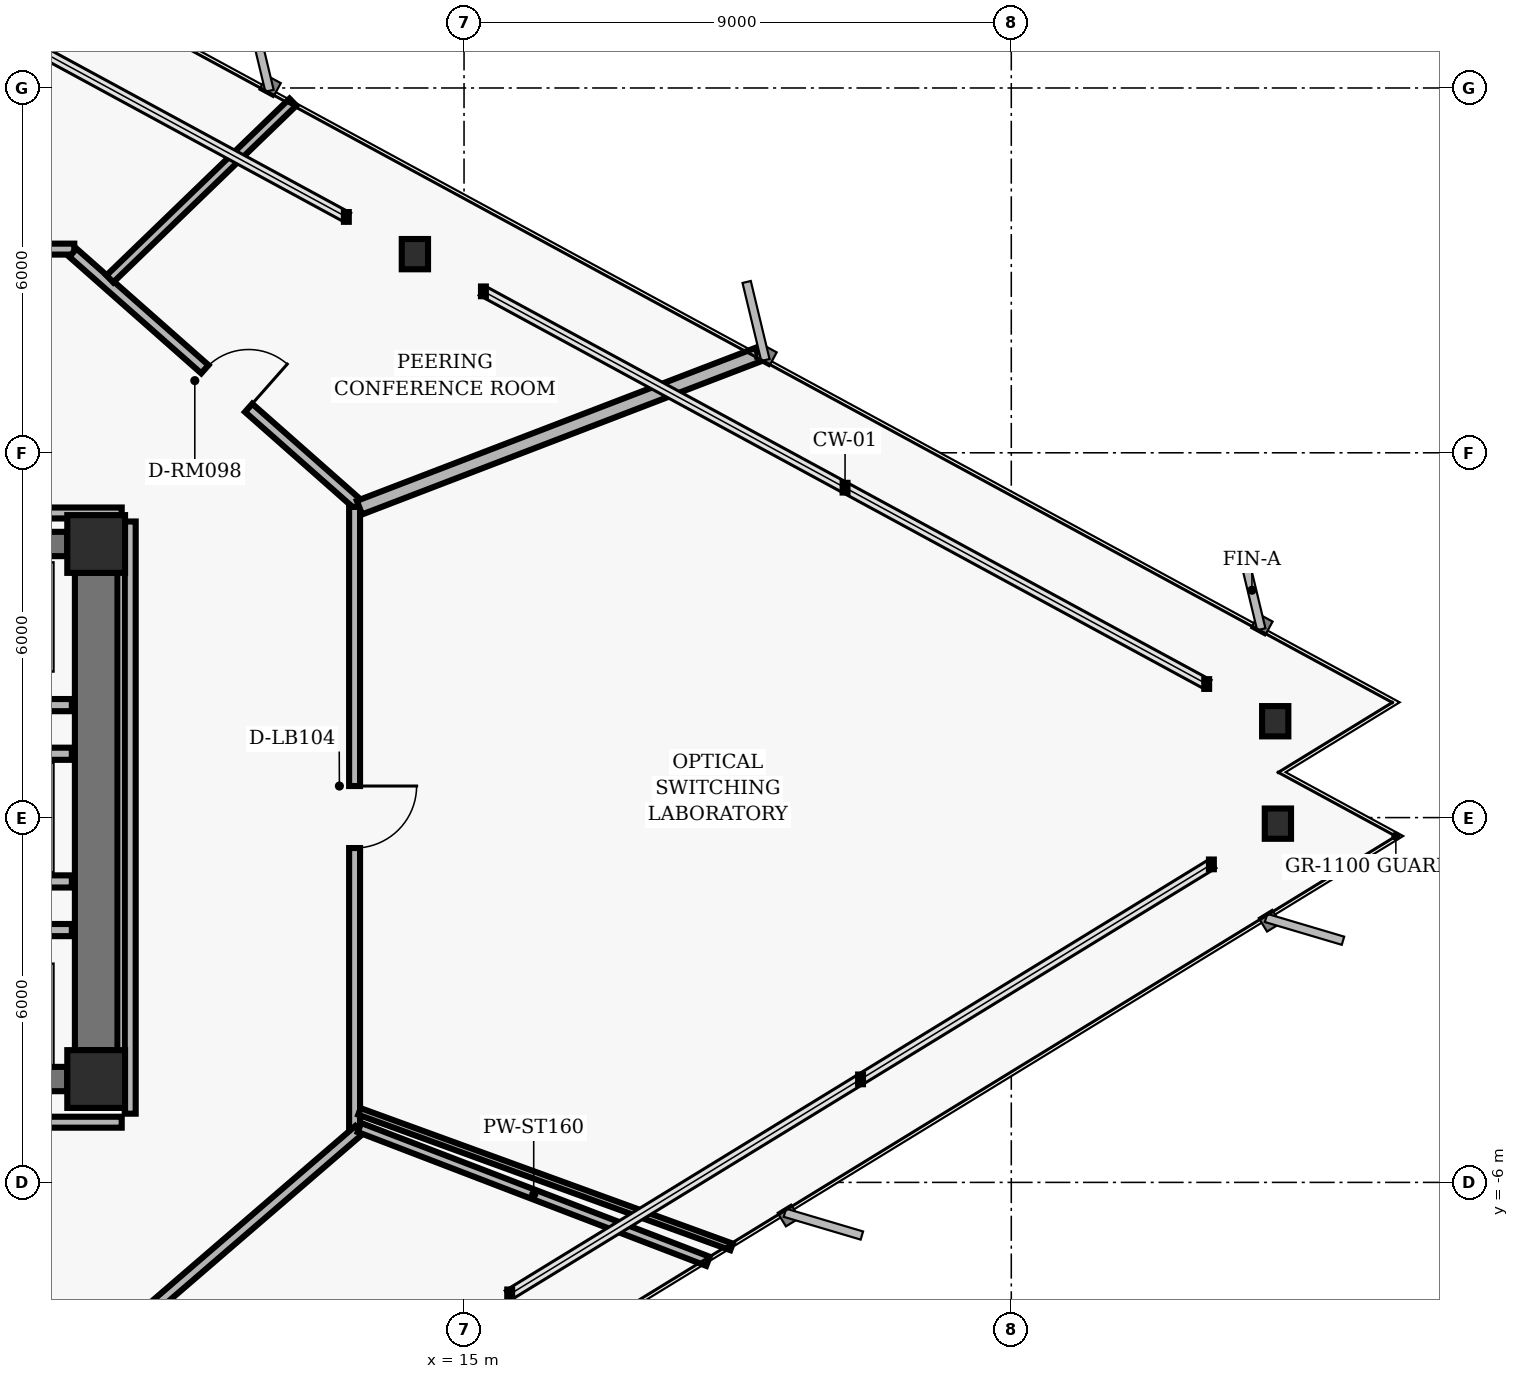
"""IFC4 building model, lengths in metres.
Left out: names, types, materials, properties, quantities, classifications, styles, units other than length and angle.
Written with IfcOpenShell. Run it as: python <this file> out.ifc"""

import sys

from ifc_helpers import new_model, si_unit, direction, frame, frame_2d, origin, origin_2d, place, context, subcontext, project, spatial, rectangle, hollow_rectangle, i_section, extrude, element, fill, save


model = new_model("IFC4")
c1 = context("Model", 3, precision=1e-05, world=origin(), true_north=direction((0.0, 1.0)))
c2 = subcontext(c1, "Body", "Model", "MODEL_VIEW")
j1 = project(units=[si_unit("LENGTHUNIT", "METRE"), si_unit("PLANEANGLEUNIT", "RADIAN")], contexts=[c1])
p1 = place(None, origin())
s1 = spatial("IfcSite", under=j1, at=p1, CompositionType="ELEMENT")
p2 = place(p1, origin())
s2 = spatial("IfcBuilding", under=s1, at=p2, CompositionType="ELEMENT")
p3 = place(p2, frame((0.0, 0.0, 22.24)))
s3 = spatial("IfcBuildingStorey", under=s2, at=p3, CompositionType="ELEMENT", Elevation=22.24)
for number, where, z_axis, x_axis in (
    (1, (8.95, 4.5, 0.0), (0.0, 0.0, 1.0), (1.0, 0.0, 0.0)),
    (2, (8.95, -4.3, 0.0), (0.0, 0.0, 1.0), (1.0, 0.0, 0.0)),
):
    element("IfcColumn", number, at=place(p3, frame(where, z_axis=z_axis, x_axis=x_axis)), inside=s3, PredefinedType="COLUMN", context=c2, shape_type="SweptSolid", body=[
        extrude(hollow_rectangle(XDim=0.95, YDim=0.95, WallThickness=0.06, InnerFilletRadius=0.02, OuterFilletRadius=0.04, at=origin_2d()), origin(), (0.0, 0.0, 1.0), 3.36),
    ])
p4 = place(p3, frame((8.95, -3.825, 0.0), z_axis=(0.0, 0.0, 1.0), x_axis=(0.0, 1.0, 0.0)))
e3 = element("IfcWall", 3, at=p4, inside=s3, PredefinedType="SHEAR", context=c2, shape_type="SweptSolid", body=[
    extrude(rectangle(XDim=7.85, YDim=0.7, at=frame_2d((3.925, 0.0))), origin(), (0.0, 0.0, 1.0), 3.098),
])
for number, where, z_axis, x_axis in (
    (4, (6.525, 4.5, 0.0), (0.0, 0.0, 1.0), (1.0, 0.0, 0.0)),
    (5, (6.525, -4.3, 0.0), (0.0, 0.0, 1.0), (1.0, 0.0, 0.0)),
):
    element("IfcWall", number, at=place(p3, frame(where, z_axis=z_axis, x_axis=x_axis)), inside=s3, PredefinedType="SHEAR", context=c2, shape_type="SweptSolid", body=[
        extrude(rectangle(XDim=1.95, YDim=0.4, at=frame_2d((0.975, 0.0))), origin(), (0.0, 0.0, 1.0), 3.098),
    ])
for number, where, z_axis, x_axis in (
    (6, (28.341, 1.585, 0.0), (0.0, 0.0, 1.0), (1.0, 0.0, 0.0)),
    (7, (14.192, 9.267, 0.0), (0.0, 0.0, 1.0), (1.0, 0.0, 0.0)),
    (8, (28.385, -0.1, 0.0), (0.0, 0.0, 1.0), (1.0, 0.0, 0.0)),
):
    element("IfcColumn", number, at=place(p3, frame(where, z_axis=z_axis, x_axis=x_axis)), inside=s3, PredefinedType="COLUMN", context=c2, shape_type="SweptSolid", body=[
        extrude(i_section(OverallWidth=0.432, OverallDepth=0.498, WebThickness=0.056, FlangeThickness=0.089, FilletRadius=0.025, at=origin_2d()), origin(), (0.0, 0.0, 1.0), 3.36),
    ])
for number, where, z_axis, x_axis in (
    (9, (6.45, -1.85, 0.0), (0.0, 0.0, 1.0), (1.0, 0.0, 0.0)),
    (10, (6.45, 1.85, 0.0), (0.0, 0.0, 1.0), (1.0, 0.0, 0.0)),
):
    element("IfcWall", number, at=place(p3, frame(where, z_axis=z_axis, x_axis=x_axis)), inside=s3, PredefinedType="PARTITIONING", context=c2, shape_type="SweptSolid", body=[
        extrude(rectangle(XDim=2.1, YDim=0.2, at=frame_2d((1.05, 0.0))), origin(), (0.0, 0.0, 1.0), 3.073),
    ])
for number, where, z_axis, x_axis in (
    (11, (6.64, -1.05, 0.0), (0.0, 0.0, 1.0), (1.0, 0.0, 0.0)),
    (12, (6.64, 1.05, 0.0), (0.0, 0.0, 1.0), (1.0, 0.0, 0.0)),
):
    element("IfcWall", number, at=place(p3, frame(where, z_axis=z_axis, x_axis=x_axis)), inside=s3, PredefinedType="PARTITIONING", context=c2, shape_type="SweptSolid", body=[
        extrude(rectangle(XDim=1.91, YDim=0.2, at=frame_2d((0.955, 0.0))), origin(), (0.0, 0.0, 1.0), 3.073),
    ])
p5 = place(p3, frame((-8.59, 9.35, 0.0), z_axis=(0.0, 0.0, 1.0), x_axis=(1.0, 0.0, 0.0)))
e13 = element("IfcWall", 13, at=p5, inside=s3, PredefinedType="PARTITIONING", context=c2, shape_type="SweptSolid", body=[
    extrude(rectangle(XDim=17.18, YDim=0.18, at=frame_2d((8.59, 0.0))), origin(), (0.0, 0.0, 1.0), 2.587),
])
p6 = place(p5, frame((10.924, 0.0, 0.0)))
e14 = element("IfcOpeningElement", 14, at=p6, cuts=e13, PredefinedType="OPENING", context=c2, shape_type="SweptSolid", body=[
    extrude(rectangle(XDim=0.96, YDim=2.02, at=frame_2d((0.48, 1.01))), frame((0.0, 0.1, 0.0), z_axis=(0.0, -1.0, 0.0), x_axis=(1.0, 0.0, 0.0)), (0.0, 0.0, 1.0), 0.2),
])
p7 = place(p3, frame((8.567, 9.29, 0.0), z_axis=(0.0, 0.0, 1.0), x_axis=(0.749626463267, -0.66186113768, 0.0)))
e15 = element("IfcWall", 15, at=p7, inside=s3, PredefinedType="PARTITIONING", context=c2, shape_type="SweptSolid", body=[
    extrude(rectangle(XDim=6.27, YDim=0.18, at=frame_2d((3.135, 0.0))), origin(), (0.0, 0.0, 1.0), 2.587),
])
p8 = place(p7, frame((2.895, 0.0, 0.0)))
e16 = element("IfcOpeningElement", 16, at=p8, cuts=e15, PredefinedType="OPENING", context=c2, shape_type="SweptSolid", body=[
    extrude(rectangle(XDim=0.96, YDim=2.02, at=frame_2d((0.48, 1.01))), frame((0.0, 0.1, 0.0), z_axis=(0.0, -1.0, 0.0), x_axis=(1.0, 0.0, 0.0)), (0.0, 0.0, 1.0), 0.2),
])
p9 = place(p3, frame((13.2, 5.11, 0.0), z_axis=(0.0, 0.0, 1.0), x_axis=(0.0, -1.0, 0.0)))
e17 = element("IfcWall", 17, at=p9, inside=s3, PredefinedType="PARTITIONING", context=c2, shape_type="SweptSolid", body=[
    extrude(rectangle(XDim=10.22, YDim=0.18, at=frame_2d((5.11, 0.0))), origin(), (0.0, 0.0, 1.0), 3.073),
])
p10 = place(p9, frame((4.591, 0.0, 0.0)))
e18 = element("IfcOpeningElement", 18, at=p10, cuts=e17, PredefinedType="OPENING", context=c2, shape_type="SweptSolid", body=[
    extrude(rectangle(XDim=1.02, YDim=2.02, at=frame_2d((0.51, 1.01))), frame((0.0, 0.1, 0.0), z_axis=(0.0, -1.0, 0.0), x_axis=(1.0, 0.0, 0.0)), (0.0, 0.0, 1.0), 0.2),
])
p11 = place(p3, frame((13.268, -5.141, 0.0), z_axis=(0.0, 0.0, 1.0), x_axis=(-0.757534501725, -0.65279512766, 0.0)))
e19 = element("IfcWall", 19, at=p11, inside=s3, PredefinedType="PARTITIONING", context=c2, shape_type="SweptSolid", body=[
    extrude(rectangle(XDim=6.385, YDim=0.18, at=frame_2d((3.192, 0.0))), origin(), (0.0, 0.0, 1.0), 2.587),
])
p12 = place(p3, frame((6.03, -5.01, 0.0), z_axis=(0.0, 0.0, 1.0), x_axis=(1.0, 0.0, 0.0)))
e20 = element("IfcWall", 20, at=p12, inside=s3, PredefinedType="PARTITIONING", context=c2, shape_type="SweptSolid", body=[
    extrude(rectangle(XDim=3.34, YDim=0.18, at=frame_2d((1.67, 0.0))), origin(), (0.0, 0.0, 1.0), 3.073),
])
p13 = place(p3, frame((9.51, -4.87, 0.0), z_axis=(0.0, 0.0, 1.0), x_axis=(0.0, 1.0, 0.0)))
e21 = element("IfcWall", 21, at=p13, inside=s3, PredefinedType="PARTITIONING", context=c2, shape_type="SweptSolid", body=[
    extrude(rectangle(XDim=9.74, YDim=0.18, at=frame_2d((4.87, 0.0))), origin(), (0.0, 0.0, 1.0), 3.073),
])
p14 = place(p3, frame((9.37, 5.01, 0.0), z_axis=(0.0, 0.0, 1.0), x_axis=(-1.0, 0.0, 0.0)))
e22 = element("IfcWall", 22, at=p14, inside=s3, PredefinedType="PARTITIONING", context=c2, shape_type="SweptSolid", body=[
    extrude(rectangle(XDim=2.808, YDim=0.18, at=frame_2d((1.404, 0.0))), origin(), (0.0, 0.0, 1.0), 3.073),
])
p15 = place(p3, frame((13.28, -5.098, 0.0), z_axis=(0.0, 0.0, 1.0), x_axis=(0.933574999212, -0.358382087787, 0.0)))
e23 = element("IfcWall", 23, at=p15, inside=s3, PredefinedType="PARTITIONING", context=c2, shape_type="SweptSolid", body=[
    extrude(rectangle(XDim=6.139, YDim=0.16, at=frame_2d((3.07, 0.0))), origin(), (0.0, 0.0, 1.0), 3.073),
])
p16 = place(p3, frame((13.28, -4.833, 0.0), z_axis=(0.0, 0.0, 1.0), x_axis=(0.939690475906, -0.342026036278, 0.0)))
e24 = element("IfcWall", 24, at=p16, inside=s3, PredefinedType="MOVABLE", context=c2, shape_type="SweptSolid", body=[
    extrude(rectangle(XDim=6.511, YDim=0.115, at=frame_2d((3.256, 0.0))), origin(), (0.0, 0.0, 1.0), 3.073),
])
p17 = place(p3, frame((13.28, 5.098, 0.0), z_axis=(0.0, 0.0, 1.0), x_axis=(0.933577510578, 0.358375545681, 0.0)))
e25 = element("IfcWall", 25, at=p17, inside=s3, PredefinedType="PARTITIONING", context=c2, shape_type="SweptSolid", body=[
    extrude(rectangle(XDim=7.021, YDim=0.24, at=frame_2d((3.511, 0.0))), origin(), (0.0, 0.0, 1.0), 3.073),
])
p18 = place(p3, frame((9.175, 8.861, 0.0), z_axis=(0.0, 0.0, 1.0), x_axis=(0.719367279815, 0.694629913502, 0.0)))
e26 = element("IfcWall", 26, at=p18, inside=s3, PredefinedType="PARTITIONING", context=c2, shape_type="SweptSolid", body=[
    extrude(rectangle(XDim=4.185, YDim=0.16, at=frame_2d((2.092, 0.0))), origin(), (0.0, 0.0, 1.0), 3.073),
])
p19 = place(p10, origin())
e27 = element("IfcDoor", 27, at=p19, inside=s3, OperationType="SINGLE_SWING_LEFT", PredefinedType="DOOR", context=c2, shape_type="SweptSolid", body=[
    extrude(rectangle(XDim=1.02, YDim=2.02, at=frame_2d((0.51, 1.01))), frame((0.0, 0.025, 0.0), z_axis=(0.0, -1.0, 0.0), x_axis=(1.0, 0.0, 0.0)), (0.0, 0.0, 1.0), 0.05),
])
fill(e18, e27)
p20 = place(p8, origin())
e28 = element("IfcDoor", 28, at=p20, inside=s3, OperationType="SINGLE_SWING_RIGHT", PredefinedType="DOOR", context=c2, shape_type="SweptSolid", body=[
    extrude(rectangle(XDim=0.96, YDim=2.02, at=frame_2d((0.48, 1.01))), frame((0.0, 0.025, 0.0), z_axis=(0.0, -1.0, 0.0), x_axis=(1.0, 0.0, 0.0)), (0.0, 0.0, 1.0), 0.05),
])
fill(e16, e28)
save(model, sys.argv[1])
